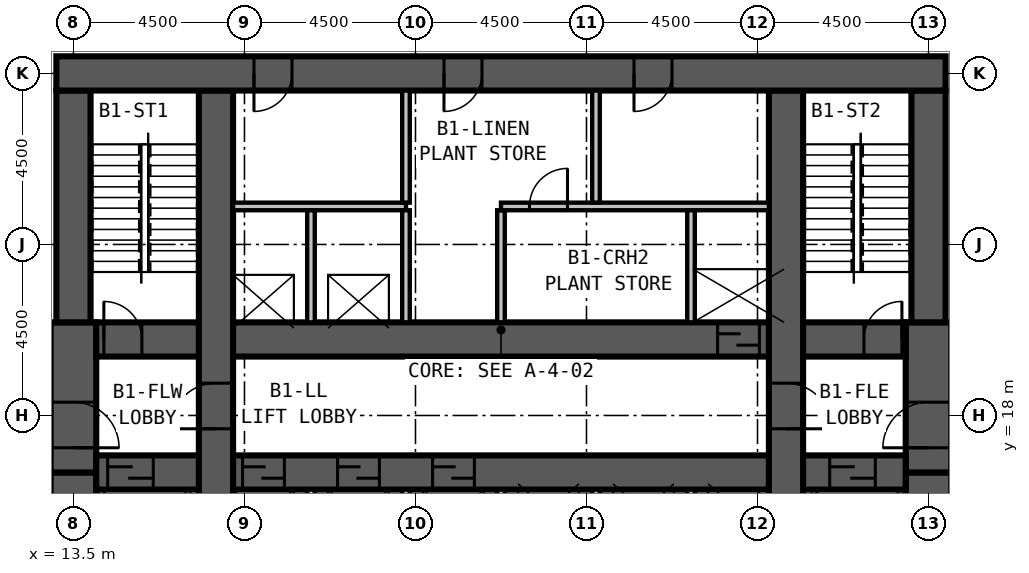
"""IFC4 building model, lengths in metres.
Left out: names, types, materials, properties, quantities, classifications, styles, units other than length and angle.
Written with IfcOpenShell. Run it as: python <this file> out.ifc"""

import sys

from ifc_helpers import new_model, si_unit, direction, frame, frame_2d, origin, place, context, subcontext, project, spatial, rectangle, extrude, element, fill, save


model = new_model("IFC4")
c1 = context("Model", 3, precision=1e-05, world=origin(), true_north=direction((0.0, 1.0)))
c2 = subcontext(c1, "Body", "Model", "MODEL_VIEW")
j1 = project(units=[si_unit("LENGTHUNIT", "METRE"), si_unit("PLANEANGLEUNIT", "RADIAN")], contexts=[c1])
p1 = place(None, origin())
s1 = spatial("IfcSite", under=j1, at=p1, CompositionType="ELEMENT")
p2 = place(p1, origin())
s2 = spatial("IfcBuilding", under=s1, at=p2, CompositionType="ELEMENT")
p3 = place(p2, frame((0.0, 0.0, -4.5)))
s3 = spatial("IfcBuildingStorey", under=s2, at=p3, CompositionType="ELEMENT", Elevation=-4.5)
p4 = place(p3, frame((36.45, 27.0, 0.0), z_axis=(0.0, 0.0, 1.0), x_axis=(-1.0, 0.0, 0.0)))
e1 = element("IfcWall", 1, at=p4, inside=s3, PredefinedType="SHEAR", context=c2, shape_type="SweptSolid", body=[
    extrude(rectangle(XDim=23.4, YDim=0.9, at=frame_2d((11.7, 0.0))), origin(), (0.0, 0.0, 1.0), 4.5),
])
p5 = place(p4, frame((17.2, 0.0, 0.0)))
e2 = element("IfcOpeningElement", 2, at=p5, cuts=e1, PredefinedType="OPENING", context=c2, shape_type="SweptSolid", body=[
    extrude(rectangle(XDim=1.0, YDim=2.1, at=frame_2d((0.5, 1.05))), frame((0.0, 0.46, 0.0), z_axis=(0.0, -1.0, 0.0), x_axis=(1.0, 0.0, 0.0)), (0.0, 0.0, 1.0), 0.92),
])
p6 = place(p4, frame((12.2, 0.0, 0.0)))
e3 = element("IfcOpeningElement", 3, at=p6, cuts=e1, PredefinedType="OPENING", context=c2, shape_type="SweptSolid", body=[
    extrude(rectangle(XDim=1.0, YDim=2.1, at=frame_2d((0.5, 1.05))), frame((0.0, 0.46, 0.0), z_axis=(0.0, -1.0, 0.0), x_axis=(1.0, 0.0, 0.0)), (0.0, 0.0, 1.0), 0.92),
])
p7 = place(p4, frame((7.2, 0.0, 0.0)))
e4 = element("IfcOpeningElement", 4, at=p7, cuts=e1, PredefinedType="OPENING", context=c2, shape_type="SweptSolid", body=[
    extrude(rectangle(XDim=1.0, YDim=2.1, at=frame_2d((0.5, 1.05))), frame((0.0, 0.46, 0.0), z_axis=(0.0, -1.0, 0.0), x_axis=(1.0, 0.0, 0.0)), (0.0, 0.0, 1.0), 0.92),
])
p8 = place(p3, frame((17.25, 13.95, 0.0), z_axis=(0.0, 0.0, 1.0), x_axis=(0.0, 1.0, 0.0)))
e5 = element("IfcWall", 5, at=p8, inside=s3, PredefinedType="SHEAR", context=c2, shape_type="SweptSolid", body=[
    extrude(rectangle(XDim=12.6, YDim=0.9, at=frame_2d((6.3, 0.0))), origin(), (0.0, 0.0, 1.0), 4.5),
])
p9 = place(p8, frame((3.7, 0.0, 0.0)))
e6 = element("IfcOpeningElement", 6, at=p9, cuts=e5, PredefinedType="OPENING", context=c2, shape_type="SweptSolid", body=[
    extrude(rectangle(XDim=1.2, YDim=2.1, at=frame_2d((0.6, 1.05))), frame((0.0, 0.46, 0.0), z_axis=(0.0, -1.0, 0.0), x_axis=(1.0, 0.0, 0.0)), (0.0, 0.0, 1.0), 0.92),
])
p10 = place(p3, frame((32.25, 13.95, 0.0), z_axis=(0.0, 0.0, 1.0), x_axis=(0.0, 1.0, 0.0)))
e7 = element("IfcWall", 7, at=p10, inside=s3, PredefinedType="SHEAR", context=c2, shape_type="SweptSolid", body=[
    extrude(rectangle(XDim=12.6, YDim=0.9, at=frame_2d((6.3, 0.0))), origin(), (0.0, 0.0, 1.0), 4.5),
])
p11 = place(p10, frame((4.9, 0.0, 0.0), z_axis=(0.0, 0.0, 1.0), x_axis=(-1.0, 0.0, 0.0)))
e8 = element("IfcOpeningElement", 8, at=p11, cuts=e7, PredefinedType="OPENING", context=c2, shape_type="SweptSolid", body=[
    extrude(rectangle(XDim=1.2, YDim=2.1, at=frame_2d((0.6, 1.05))), frame((0.0, 0.46, 0.0), z_axis=(0.0, -1.0, 0.0), x_axis=(1.0, 0.0, 0.0)), (0.0, 0.0, 1.0), 0.92),
])
p12 = place(p3, frame((14.1, 16.5, 0.0), z_axis=(0.0, 0.0, 1.0), x_axis=(1.0, 0.0, 0.0)))
e9 = element("IfcWall", 9, at=p12, inside=s3, PredefinedType="SHEAR", context=c2, shape_type="SweptSolid", body=[
    extrude(rectangle(XDim=21.3, YDim=0.9, at=frame_2d((10.65, 0.0))), origin(), (0.0, 0.0, 1.0), 4.5),
])
p13 = place(p12, frame((3.85, 0.0, 0.0)))
e10 = element("IfcOpeningElement", 10, at=p13, cuts=e9, PredefinedType="OPENING", context=c2, shape_type="SweptSolid", body=[
    extrude(rectangle(XDim=1.1, YDim=2.1, at=frame_2d((0.55, 1.05))), frame((0.0, 0.46, 0.0), z_axis=(0.0, -1.0, 0.0), x_axis=(1.0, 0.0, 0.0)), (0.0, 0.0, 1.0), 0.92),
])
p14 = place(p12, frame((6.35, 0.0, 0.0)))
e11 = element("IfcOpeningElement", 11, at=p14, cuts=e9, PredefinedType="OPENING", context=c2, shape_type="SweptSolid", body=[
    extrude(rectangle(XDim=1.1, YDim=2.1, at=frame_2d((0.55, 1.05))), frame((0.0, 0.46, 0.0), z_axis=(0.0, -1.0, 0.0), x_axis=(1.0, 0.0, 0.0)), (0.0, 0.0, 1.0), 0.92),
])
p15 = place(p12, frame((8.85, 0.0, 0.0)))
e12 = element("IfcOpeningElement", 12, at=p15, cuts=e9, PredefinedType="OPENING", context=c2, shape_type="SweptSolid", body=[
    extrude(rectangle(XDim=1.1, YDim=2.1, at=frame_2d((0.55, 1.05))), frame((0.0, 0.46, 0.0), z_axis=(0.0, -1.0, 0.0), x_axis=(1.0, 0.0, 0.0)), (0.0, 0.0, 1.0), 0.92),
])
p16 = place(p12, frame((0.3, 0.0, 0.0)))
e13 = element("IfcOpeningElement", 13, at=p16, cuts=e9, PredefinedType="OPENING", context=c2, shape_type="SweptSolid", body=[
    extrude(rectangle(XDim=1.2, YDim=2.1, at=frame_2d((0.6, 1.05))), frame((0.0, 0.46, 0.0), z_axis=(0.0, -1.0, 0.0), x_axis=(1.0, 0.0, 0.0)), (0.0, 0.0, 1.0), 0.92),
])
p17 = place(p12, frame((19.3, 0.0, 0.0)))
e14 = element("IfcOpeningElement", 14, at=p17, cuts=e9, PredefinedType="OPENING", context=c2, shape_type="SweptSolid", body=[
    extrude(rectangle(XDim=1.2, YDim=2.1, at=frame_2d((0.6, 1.05))), frame((0.0, 0.46, 0.0), z_axis=(0.0, -1.0, 0.0), x_axis=(1.0, 0.0, 0.0)), (0.0, 0.0, 1.0), 0.92),
])
p18 = place(p3, frame((14.1, 20.0, 0.0), z_axis=(0.0, 0.0, 1.0), x_axis=(1.0, 0.0, 0.0)))
e15 = element("IfcWall", 15, at=p18, inside=s3, PredefinedType="SHEAR", context=c2, shape_type="SweptSolid", body=[
    extrude(rectangle(XDim=21.3, YDim=0.9, at=frame_2d((10.65, 0.0))), origin(), (0.0, 0.0, 1.0), 4.5),
])
p19 = place(p18, frame((0.2, 0.0, 0.0)))
e16 = element("IfcOpeningElement", 16, at=p19, cuts=e15, PredefinedType="OPENING", context=c2, shape_type="SweptSolid", body=[
    extrude(rectangle(XDim=1.0, YDim=2.1, at=frame_2d((0.5, 1.05))), frame((0.0, 0.46, 0.0), z_axis=(0.0, -1.0, 0.0), x_axis=(1.0, 0.0, 0.0)), (0.0, 0.0, 1.0), 0.92),
])
p20 = place(p18, frame((20.2, 0.0, 0.0)))
e17 = element("IfcOpeningElement", 17, at=p20, cuts=e15, PredefinedType="OPENING", context=c2, shape_type="SweptSolid", body=[
    extrude(rectangle(XDim=1.0, YDim=2.1, at=frame_2d((0.5, 1.05))), frame((0.0, 0.46, 0.0), z_axis=(0.0, -1.0, 0.0), x_axis=(1.0, 0.0, 0.0)), (0.0, 0.0, 1.0), 0.92),
])
p21 = place(p18, frame((16.35, 0.0, 0.0)))
e18 = element("IfcOpeningElement", 18, at=p21, cuts=e15, PredefinedType="OPENING", context=c2, shape_type="SweptSolid", body=[
    extrude(rectangle(XDim=1.1, YDim=2.1, at=frame_2d((0.55, 1.05))), frame((0.0, 0.46, 0.0), z_axis=(0.0, -1.0, 0.0), x_axis=(1.0, 0.0, 0.0)), (0.0, 0.0, 1.0), 0.92),
])
p22 = place(p3, frame((13.5, 26.55, 0.0), z_axis=(0.0, 0.0, 1.0), x_axis=(0.0, -1.0, 0.0)))
e19 = element("IfcWall", 19, at=p22, inside=s3, PredefinedType="SHEAR", context=c2, shape_type="SweptSolid", body=[
    extrude(rectangle(XDim=6.1, YDim=0.9, at=frame_2d((3.05, 0.0))), origin(), (0.0, 0.0, 1.0), 4.5),
])
p23 = place(p3, frame((13.5, 20.45, 0.0), z_axis=(0.0, 0.0, 1.0), x_axis=(0.0, -1.0, 0.0)))
e20 = element("IfcWall", 20, at=p23, inside=s3, PredefinedType="SHEAR", context=c2, shape_type="SweptSolid", body=[
    extrude(rectangle(XDim=3.95, YDim=1.2, at=frame_2d((1.975, 0.0))), origin(), (0.0, 0.0, 1.0), 4.5),
])
p24 = place(p23, frame((2.1, 0.0, 0.0)))
e21 = element("IfcOpeningElement", 21, at=p24, cuts=e20, PredefinedType="OPENING", context=c2, shape_type="SweptSolid", body=[
    extrude(rectangle(XDim=1.2, YDim=2.1, at=frame_2d((0.6, 1.05))), frame((0.0, 0.61, 0.0), z_axis=(0.0, -1.0, 0.0), x_axis=(1.0, 0.0, 0.0)), (0.0, 0.0, 1.0), 1.22),
])
for number, where, z_axis, x_axis in (
    (22, (13.5, 16.5, 0.0), (0.0, 0.0, 1.0), (0.0, -1.0, 0.0)),
    (23, (36.0, 13.95, 0.0), (0.0, 0.0, 1.0), (0.0, 1.0, 0.0)),
):
    element("IfcWall", number, at=place(p3, frame(where, z_axis=z_axis, x_axis=x_axis)), inside=s3, PredefinedType="SHEAR", context=c2, shape_type="SweptSolid", body=[
        extrude(rectangle(XDim=2.55, YDim=1.2, at=frame_2d((1.275, 0.0))), origin(), (0.0, 0.0, 1.0), 4.5),
    ])
p25 = place(p3, frame((36.0, 16.5, 0.0), z_axis=(0.0, 0.0, 1.0), x_axis=(0.0, 1.0, 0.0)))
e24 = element("IfcWall", 24, at=p25, inside=s3, PredefinedType="SHEAR", context=c2, shape_type="SweptSolid", body=[
    extrude(rectangle(XDim=3.95, YDim=1.2, at=frame_2d((1.975, 0.0))), origin(), (0.0, 0.0, 1.0), 4.5),
])
p26 = place(p25, frame((0.65, 0.0, 0.0)))
e25 = element("IfcOpeningElement", 25, at=p26, cuts=e24, PredefinedType="OPENING", context=c2, shape_type="SweptSolid", body=[
    extrude(rectangle(XDim=1.2, YDim=2.1, at=frame_2d((0.6, 1.05))), frame((0.0, 0.61, 0.0), z_axis=(0.0, -1.0, 0.0), x_axis=(1.0, 0.0, 0.0)), (0.0, 0.0, 1.0), 1.22),
])
p27 = place(p3, frame((36.0, 20.45, 0.0), z_axis=(0.0, 0.0, 1.0), x_axis=(0.0, 1.0, 0.0)))
e26 = element("IfcWall", 26, at=p27, inside=s3, PredefinedType="SHEAR", context=c2, shape_type="SweptSolid", body=[
    extrude(rectangle(XDim=6.1, YDim=0.9, at=frame_2d((3.05, 0.0))), origin(), (0.0, 0.0, 1.0), 4.5),
])
p28 = place(p3, frame((19.75, 13.95, 0.0), z_axis=(0.0, 0.0, 1.0), x_axis=(0.0, 1.0, 0.0)))
e27 = element("IfcWall", 27, at=p28, inside=s3, PredefinedType="PARTITIONING", context=c2, shape_type="SweptSolid", body=[
    extrude(rectangle(XDim=2.1, YDim=0.2, at=frame_2d((1.05, 0.0))), origin(), (0.0, 0.0, 1.0), 4.2),
])
p29 = place(p3, frame((19.75, 20.45, 0.0), z_axis=(0.0, 0.0, 1.0), x_axis=(0.0, 1.0, 0.0)))
e28 = element("IfcWall", 28, at=p29, inside=s3, PredefinedType="PARTITIONING", context=c2, shape_type="SweptSolid", body=[
    extrude(rectangle(XDim=2.95, YDim=0.2, at=frame_2d((1.475, 0.0))), origin(), (0.0, 0.0, 1.0), 4.2),
])
p30 = place(p3, frame((22.25, 13.95, 0.0), z_axis=(0.0, 0.0, 1.0), x_axis=(0.0, 1.0, 0.0)))
e29 = element("IfcWall", 29, at=p30, inside=s3, PredefinedType="PARTITIONING", context=c2, shape_type="SweptSolid", body=[
    extrude(rectangle(XDim=2.1, YDim=0.2, at=frame_2d((1.05, 0.0))), origin(), (0.0, 0.0, 1.0), 4.2),
])
p31 = place(p3, frame((22.25, 20.45, 0.0), z_axis=(0.0, 0.0, 1.0), x_axis=(0.0, 1.0, 0.0)))
e30 = element("IfcWall", 30, at=p31, inside=s3, PredefinedType="PARTITIONING", context=c2, shape_type="SweptSolid", body=[
    extrude(rectangle(XDim=2.95, YDim=0.2, at=frame_2d((1.475, 0.0))), origin(), (0.0, 0.0, 1.0), 4.2),
])
p32 = place(p3, frame((24.75, 13.95, 0.0), z_axis=(0.0, 0.0, 1.0), x_axis=(0.0, 1.0, 0.0)))
e31 = element("IfcWall", 31, at=p32, inside=s3, PredefinedType="PARTITIONING", context=c2, shape_type="SweptSolid", body=[
    extrude(rectangle(XDim=2.1, YDim=0.2, at=frame_2d((1.05, 0.0))), origin(), (0.0, 0.0, 1.0), 4.2),
])
p33 = place(p3, frame((24.75, 20.45, 0.0), z_axis=(0.0, 0.0, 1.0), x_axis=(0.0, 1.0, 0.0)))
e32 = element("IfcWall", 32, at=p33, inside=s3, PredefinedType="PARTITIONING", context=c2, shape_type="SweptSolid", body=[
    extrude(rectangle(XDim=2.95, YDim=0.2, at=frame_2d((1.475, 0.0))), origin(), (0.0, 0.0, 1.0), 4.2),
])
for number, where, z_axis, x_axis in (
    (33, (27.25, 13.95, 0.0), (0.0, 0.0, 1.0), (0.0, 1.0, 0.0)),
    (34, (29.75, 13.95, 0.0), (0.0, 0.0, 1.0), (0.0, 1.0, 0.0)),
):
    element("IfcWall", number, at=place(p3, frame(where, z_axis=z_axis, x_axis=x_axis)), inside=s3, PredefinedType="PARTITIONING", context=c2, shape_type="SweptSolid", body=[
        extrude(rectangle(XDim=2.1, YDim=0.2, at=frame_2d((1.05, 0.0))), origin(), (0.0, 0.0, 1.0), 4.2),
    ])
p34 = place(p3, frame((29.75, 20.45, 0.0), z_axis=(0.0, 0.0, 1.0), x_axis=(0.0, 1.0, 0.0)))
e35 = element("IfcWall", 35, at=p34, inside=s3, PredefinedType="PARTITIONING", context=c2, shape_type="SweptSolid", body=[
    extrude(rectangle(XDim=2.95, YDim=0.2, at=frame_2d((1.475, 0.0))), origin(), (0.0, 0.0, 1.0), 4.2),
])
p35 = place(p3, frame((17.7, 23.5, 0.0), z_axis=(0.0, 0.0, 1.0), x_axis=(1.0, 0.0, 0.0)))
e36 = element("IfcWall", 36, at=p35, inside=s3, PredefinedType="PARTITIONING", context=c2, shape_type="SweptSolid", body=[
    extrude(rectangle(XDim=4.55, YDim=0.2, at=frame_2d((2.275, 0.0))), origin(), (0.0, 0.0, 1.0), 4.2),
])
p36 = place(p3, frame((24.75, 23.5, 0.0), z_axis=(0.0, 0.0, 1.0), x_axis=(1.0, 0.0, 0.0)))
e37 = element("IfcWall", 37, at=p36, inside=s3, PredefinedType="PARTITIONING", context=c2, shape_type="SweptSolid", body=[
    extrude(rectangle(XDim=7.05, YDim=0.2, at=frame_2d((3.525, 0.0))), origin(), (0.0, 0.0, 1.0), 4.2),
])
p37 = place(p36, frame((0.75, 0.0, 0.0)))
e38 = element("IfcOpeningElement", 38, at=p37, cuts=e37, PredefinedType="OPENING", context=c2, shape_type="SweptSolid", body=[
    extrude(rectangle(XDim=1.0, YDim=2.1, at=frame_2d((0.5, 1.05))), frame((0.0, 0.11, 0.0), z_axis=(0.0, -1.0, 0.0), x_axis=(1.0, 0.0, 0.0)), (0.0, 0.0, 1.0), 0.22),
])
for number, where, z_axis, x_axis in (
    (39, (22.25, 23.6, 0.0), (0.0, 0.0, 1.0), (0.0, 1.0, 0.0)),
    (40, (27.25, 23.6, 0.0), (0.0, 0.0, 1.0), (0.0, 1.0, 0.0)),
):
    element("IfcWall", number, at=place(p3, frame(where, z_axis=z_axis, x_axis=x_axis)), inside=s3, PredefinedType="PARTITIONING", context=c2, shape_type="SweptSolid", body=[
        extrude(rectangle(XDim=2.95, YDim=0.2, at=frame_2d((1.475, 0.0))), origin(), (0.0, 0.0, 1.0), 4.2),
    ])
p38 = place(p37, origin())
e41 = element("IfcDoor", 41, at=p38, inside=s3, OperationType="SINGLE_SWING_RIGHT", PredefinedType="DOOR", context=c2, shape_type="SweptSolid", body=[
    extrude(rectangle(XDim=1.0, YDim=2.1, at=frame_2d((0.5, 1.05))), frame((0.0, 0.025, 0.0), z_axis=(0.0, -1.0, 0.0), x_axis=(1.0, 0.0, 0.0)), (0.0, 0.0, 1.0), 0.05),
])
fill(e38, e41)
p39 = place(p24, origin())
e42 = element("IfcDoor", 42, at=p39, inside=s3, OperationType="SINGLE_SWING_RIGHT", PredefinedType="DOOR", context=c2, shape_type="SweptSolid", body=[
    extrude(rectangle(XDim=1.2, YDim=2.1, at=frame_2d((0.6, 1.05))), frame((0.0, 0.575, 0.0), z_axis=(0.0, -1.0, 0.0), x_axis=(1.0, 0.0, 0.0)), (0.0, 0.0, 1.0), 1.15),
])
fill(e21, e42)
p40 = place(p26, origin())
e43 = element("IfcDoor", 43, at=p40, inside=s3, OperationType="SINGLE_SWING_LEFT", PredefinedType="DOOR", context=c2, shape_type="SweptSolid", body=[
    extrude(rectangle(XDim=1.2, YDim=2.1, at=frame_2d((0.6, 1.05))), frame((0.0, 0.575, 0.0), z_axis=(0.0, -1.0, 0.0), x_axis=(1.0, 0.0, 0.0)), (0.0, 0.0, 1.0), 1.15),
])
fill(e25, e43)
p41 = place(p9, origin())
e44 = element("IfcDoor", 44, at=p41, inside=s3, OperationType="SINGLE_SWING_LEFT", PredefinedType="DOOR", context=c2, shape_type="SweptSolid", body=[
    extrude(rectangle(XDim=1.2, YDim=2.1, at=frame_2d((0.6, 1.05))), frame((0.0, 0.45, 0.0), z_axis=(0.0, -1.0, 0.0), x_axis=(1.0, 0.0, 0.0)), (0.0, 0.0, 1.0), 0.899),
])
fill(e6, e44)
p42 = place(p11, origin())
e45 = element("IfcDoor", 45, at=p42, inside=s3, OperationType="SINGLE_SWING_RIGHT", PredefinedType="DOOR", context=c2, shape_type="SweptSolid", body=[
    extrude(rectangle(XDim=1.2, YDim=2.1, at=frame_2d((0.6, 1.05))), frame((0.0, 0.45, 0.0), z_axis=(0.0, -1.0, 0.0), x_axis=(1.0, 0.0, 0.0)), (0.0, 0.0, 1.0), 0.899),
])
fill(e8, e45)
p43 = place(p19, origin())
e46 = element("IfcDoor", 46, at=p43, inside=s3, OperationType="SINGLE_SWING_LEFT", PredefinedType="DOOR", context=c2, shape_type="SweptSolid", body=[
    extrude(rectangle(XDim=1.0, YDim=2.1, at=frame_2d((0.5, 1.05))), frame((0.0, 0.45, 0.0), z_axis=(0.0, -1.0, 0.0), x_axis=(1.0, 0.0, 0.0)), (0.0, 0.0, 1.0), 0.899),
])
fill(e16, e46)
p44 = place(p20, origin())
e47 = element("IfcDoor", 47, at=p44, inside=s3, OperationType="SINGLE_SWING_RIGHT", PredefinedType="DOOR", context=c2, shape_type="SweptSolid", body=[
    extrude(rectangle(XDim=1.0, YDim=2.1, at=frame_2d((0.5, 1.05))), frame((0.0, 0.45, 0.0), z_axis=(0.0, -1.0, 0.0), x_axis=(1.0, 0.0, 0.0)), (0.0, 0.0, 1.0), 0.899),
])
fill(e17, e47)
p45 = place(p13, origin())
e48 = element("IfcDoor", 48, at=p45, inside=s3, OperationType="SLIDING_TO_LEFT", PredefinedType="DOOR", context=c2, shape_type="SweptSolid", body=[
    extrude(rectangle(XDim=1.1, YDim=2.1, at=frame_2d((0.55, 1.05))), frame((0.0, 0.45, 0.0), z_axis=(0.0, -1.0, 0.0), x_axis=(1.0, 0.0, 0.0)), (0.0, 0.0, 1.0), 0.899),
])
fill(e10, e48)
p46 = place(p14, origin())
e49 = element("IfcDoor", 49, at=p46, inside=s3, OperationType="SLIDING_TO_LEFT", PredefinedType="DOOR", context=c2, shape_type="SweptSolid", body=[
    extrude(rectangle(XDim=1.1, YDim=2.1, at=frame_2d((0.55, 1.05))), frame((0.0, 0.45, 0.0), z_axis=(0.0, -1.0, 0.0), x_axis=(1.0, 0.0, 0.0)), (0.0, 0.0, 1.0), 0.899),
])
fill(e11, e49)
p47 = place(p15, origin())
e50 = element("IfcDoor", 50, at=p47, inside=s3, OperationType="SLIDING_TO_LEFT", PredefinedType="DOOR", context=c2, shape_type="SweptSolid", body=[
    extrude(rectangle(XDim=1.1, YDim=2.1, at=frame_2d((0.55, 1.05))), frame((0.0, 0.45, 0.0), z_axis=(0.0, -1.0, 0.0), x_axis=(1.0, 0.0, 0.0)), (0.0, 0.0, 1.0), 0.899),
])
fill(e12, e50)
p48 = place(p21, origin())
e51 = element("IfcDoor", 51, at=p48, inside=s3, OperationType="SLIDING_TO_LEFT", PredefinedType="DOOR", context=c2, shape_type="SweptSolid", body=[
    extrude(rectangle(XDim=1.1, YDim=2.1, at=frame_2d((0.55, 1.05))), frame((0.0, 0.45, 0.0), z_axis=(0.0, -1.0, 0.0), x_axis=(1.0, 0.0, 0.0)), (0.0, 0.0, 1.0), 0.899),
])
fill(e18, e51)
p49 = place(p16, origin())
e52 = element("IfcDoor", 52, at=p49, inside=s3, OperationType="SLIDING_TO_LEFT", PredefinedType="DOOR", context=c2, shape_type="SweptSolid", body=[
    extrude(rectangle(XDim=1.2, YDim=2.1, at=frame_2d((0.6, 1.05))), frame((0.0, 0.45, 0.0), z_axis=(0.0, -1.0, 0.0), x_axis=(1.0, 0.0, 0.0)), (0.0, 0.0, 1.0), 0.899),
])
fill(e13, e52)
p50 = place(p17, origin())
e53 = element("IfcDoor", 53, at=p50, inside=s3, OperationType="SLIDING_TO_LEFT", PredefinedType="DOOR", context=c2, shape_type="SweptSolid", body=[
    extrude(rectangle(XDim=1.2, YDim=2.1, at=frame_2d((0.6, 1.05))), frame((0.0, 0.45, 0.0), z_axis=(0.0, -1.0, 0.0), x_axis=(1.0, 0.0, 0.0)), (0.0, 0.0, 1.0), 0.899),
])
fill(e14, e53)
p51 = place(p5, origin())
e54 = element("IfcDoor", 54, at=p51, inside=s3, OperationType="SINGLE_SWING_RIGHT", PredefinedType="DOOR", context=c2, shape_type="SweptSolid", body=[
    extrude(rectangle(XDim=1.0, YDim=2.1, at=frame_2d((0.5, 1.05))), frame((0.0, 0.45, 0.0), z_axis=(0.0, -1.0, 0.0), x_axis=(1.0, 0.0, 0.0)), (0.0, 0.0, 1.0), 0.899),
])
fill(e2, e54)
p52 = place(p6, origin())
e55 = element("IfcDoor", 55, at=p52, inside=s3, OperationType="SINGLE_SWING_RIGHT", PredefinedType="DOOR", context=c2, shape_type="SweptSolid", body=[
    extrude(rectangle(XDim=1.0, YDim=2.1, at=frame_2d((0.5, 1.05))), frame((0.0, 0.45, 0.0), z_axis=(0.0, -1.0, 0.0), x_axis=(1.0, 0.0, 0.0)), (0.0, 0.0, 1.0), 0.899),
])
fill(e3, e55)
p53 = place(p7, origin())
e56 = element("IfcDoor", 56, at=p53, inside=s3, OperationType="SINGLE_SWING_RIGHT", PredefinedType="DOOR", context=c2, shape_type="SweptSolid", body=[
    extrude(rectangle(XDim=1.0, YDim=2.1, at=frame_2d((0.5, 1.05))), frame((0.0, 0.45, 0.0), z_axis=(0.0, -1.0, 0.0), x_axis=(1.0, 0.0, 0.0)), (0.0, 0.0, 1.0), 0.899),
])
fill(e4, e56)
save(model, sys.argv[1])
